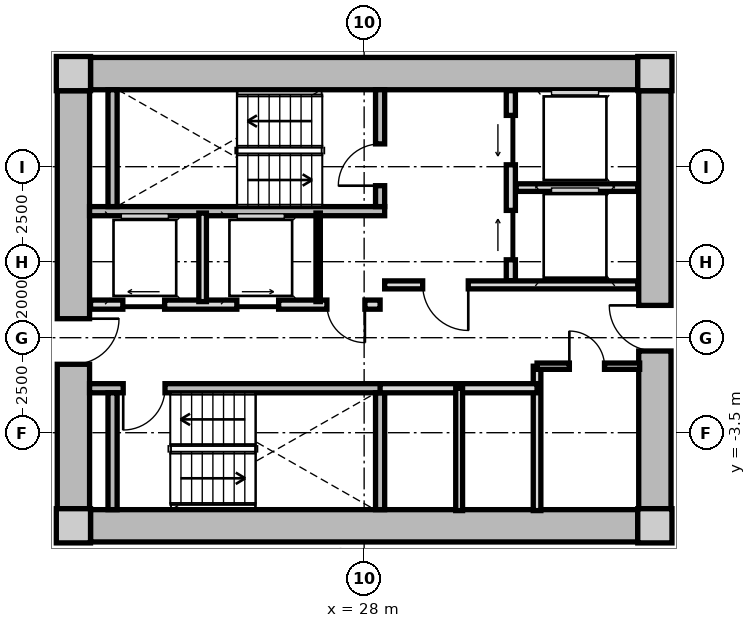
"""IFC4 building model, lengths in metres.
Left out: names, types, materials, properties, quantities, classifications, styles, units other than length and angle.
Written with IfcOpenShell. Run it as: python <this file> out.ifc"""

import sys

from ifc_helpers import new_model, si_unit, direction, frame, frame_2d, origin, origin_2d, place, context, subcontext, project, spatial, rectangle, extrude, source, transform, mapped, element, fill, save


model = new_model("IFC4")
c1 = context("Model", 3, precision=1e-05, world=origin(), true_north=direction((0.0, 1.0)))
c2 = subcontext(c1, "Body", "Model", "MODEL_VIEW")
j1 = project(units=[si_unit("LENGTHUNIT", "METRE"), si_unit("PLANEANGLEUNIT", "RADIAN")], contexts=[c1])
p1 = place(None, origin())
s1 = spatial("IfcSite", under=j1, at=p1, CompositionType="ELEMENT")
p2 = place(p1, origin())
s2 = spatial("IfcBuilding", under=s1, at=p2, CompositionType="ELEMENT")
p3 = place(p2, frame((0.0, 0.0, 27.7)))
s3 = spatial("IfcBuildingStorey", under=s2, at=p3, CompositionType="ELEMENT", Elevation=27.7)
m1 = source(origin(), c2, "Body", "SweptSolid", [
    extrude(rectangle(XDim=0.9, YDim=0.9, at=origin_2d()), origin(), (0.0, 0.0, 1.0), 3.05),
])
for number, where, z_axis, x_axis in (
    (1, (20.35, -5.95, 0.0), (0.0, 0.0, 1.0), (1.0, 0.0, 0.0)),
    (2, (35.65, -5.95, 0.0), (0.0, 0.0, 1.0), (1.0, 0.0, 0.0)),
    (3, (35.65, 5.95, 0.0), (0.0, 0.0, 1.0), (1.0, 0.0, 0.0)),
    (4, (20.35, 5.95, 0.0), (0.0, 0.0, 1.0), (1.0, 0.0, 0.0)),
):
    element("IfcColumn", number, at=place(p3, frame(where, z_axis=z_axis, x_axis=x_axis)), inside=s3, PredefinedType="COLUMN", context=c2, shape_type="MappedRepresentation", body=[
        mapped(m1, transform((0.0, 0.0, 0.0), x_axis=(1.0, 0.0, 0.0), y_axis=(0.0, 1.0, 0.0), z_axis=(0.0, 0.0, 1.0), scale=1.0)),
    ])
m2 = source(origin(), c2, "Body", "SweptSolid", [
    extrude(rectangle(XDim=14.4, YDim=0.85, at=frame_2d((7.2, 0.0))), origin(), (0.0, 0.0, 1.0), 2.79),
])
for number, where, z_axis, x_axis in (
    (5, (20.8, 5.95, 0.0), (0.0, 0.0, 1.0), (1.0, 0.0, 0.0)),
    (6, (35.2, -5.95, 0.0), (0.0, 0.0, 1.0), (-1.0, 0.0, 0.0)),
):
    element("IfcWall", number, at=place(p3, frame(where, z_axis=z_axis, x_axis=x_axis)), inside=s3, PredefinedType="SHEAR", context=c2, shape_type="MappedRepresentation", body=[
        mapped(m2, transform((0.0, 0.0, 0.0), x_axis=(1.0, 0.0, 0.0), y_axis=(0.0, 1.0, 0.0), z_axis=(0.0, 0.0, 1.0), scale=1.0)),
    ])
m3 = source(origin(), c2, "Body", "SweptSolid", [
    extrude(rectangle(XDim=11.0, YDim=0.85, at=frame_2d((5.5, 0.0))), origin(), (0.0, 0.0, 1.0), 2.79),
])
p4 = place(p3, frame((20.35, -5.5, 0.0), z_axis=(0.0, 0.0, 1.0), x_axis=(0.0, 1.0, 0.0)))
e7 = element("IfcWall", 7, at=p4, inside=s3, PredefinedType="SHEAR", context=c2, shape_type="MappedRepresentation", body=[
    mapped(m3, transform((0.0, 0.0, 0.0), x_axis=(1.0, 0.0, 0.0), y_axis=(0.0, 1.0, 0.0), z_axis=(0.0, 0.0, 1.0), scale=1.0)),
])
p5 = place(p4, frame((3.8, 0.0, 0.0)))
e8 = element("IfcOpeningElement", 8, at=p5, cuts=e7, PredefinedType="OPENING", context=c2, shape_type="SweptSolid", body=[
    extrude(rectangle(XDim=1.2, YDim=2.15, at=frame_2d((0.6, 1.075))), frame((0.0, 0.435, 0.0), z_axis=(0.0, -1.0, 0.0), x_axis=(1.0, 0.0, 0.0)), (0.0, 0.0, 1.0), 0.87),
])
p6 = place(p3, frame((35.65, 5.5, 0.0), z_axis=(0.0, 0.0, 1.0), x_axis=(0.0, -1.0, 0.0)))
e9 = element("IfcWall", 9, at=p6, inside=s3, PredefinedType="SHEAR", context=c2, shape_type="MappedRepresentation", body=[
    mapped(m3, transform((0.0, 0.0, 0.0), x_axis=(1.0, 0.0, 0.0), y_axis=(0.0, 1.0, 0.0), z_axis=(0.0, 0.0, 1.0), scale=1.0)),
])
p7 = place(p6, frame((5.65, 0.0, 0.0)))
e10 = element("IfcOpeningElement", 10, at=p7, cuts=e9, PredefinedType="OPENING", context=c2, shape_type="SweptSolid", body=[
    extrude(rectangle(XDim=1.2, YDim=2.15, at=frame_2d((0.6, 1.075))), frame((0.0, 0.435, 0.0), z_axis=(0.0, -1.0, 0.0), x_axis=(1.0, 0.0, 0.0)), (0.0, 0.0, 1.0), 0.87),
])
m4 = source(origin(), c2, "Body", "SweptSolid", [
    extrude(rectangle(XDim=7.765, YDim=0.24, at=frame_2d((3.883, 0.0))), origin(), (0.0, 0.0, 1.0), 2.79),
])
p8 = place(p3, frame((20.775, 2.33, 0.0), z_axis=(0.0, 0.0, 1.0), x_axis=(1.0, 0.0, 0.0)))
e11 = element("IfcWall", 11, at=p8, inside=s3, PredefinedType="PARTITIONING", context=c2, shape_type="MappedRepresentation", body=[
    mapped(m4, transform((0.0, 0.0, 0.0), x_axis=(1.0, 0.0, 0.0), y_axis=(0.0, 1.0, 0.0), z_axis=(0.0, 0.0, 1.0), scale=1.0)),
])
m5 = source(origin(), c2, "Body", "SweptSolid", [
    extrude(rectangle(XDim=3.075, YDim=0.24, at=frame_2d((1.538, 0.0))), origin(), (0.0, 0.0, 1.0), 2.79),
])
p9 = place(p3, frame((21.38, 2.45, 0.0), z_axis=(0.0, 0.0, 1.0), x_axis=(0.0, 1.0, 0.0)))
e12 = element("IfcWall", 12, at=p9, inside=s3, PredefinedType="PARTITIONING", context=c2, shape_type="MappedRepresentation", body=[
    mapped(m5, transform((0.0, 0.0, 0.0), x_axis=(1.0, 0.0, 0.0), y_axis=(0.0, 1.0, 0.0), z_axis=(0.0, 0.0, 1.0), scale=1.0)),
])
p10 = place(p3, frame((28.42, 2.45, 0.0), z_axis=(0.0, 0.0, 1.0), x_axis=(0.0, 1.0, 0.0)))
e13 = element("IfcWall", 13, at=p10, inside=s3, PredefinedType="PARTITIONING", context=c2, shape_type="MappedRepresentation", body=[
    mapped(m5, transform((0.0, 0.0, 0.0), x_axis=(1.0, 0.0, 0.0), y_axis=(0.0, 1.0, 0.0), z_axis=(0.0, 0.0, 1.0), scale=1.0)),
])
p11 = place(p10, frame((0.55, 0.0, 0.0)))
e14 = element("IfcOpeningElement", 14, at=p11, cuts=e13, PredefinedType="OPENING", context=c2, shape_type="SweptSolid", body=[
    extrude(rectangle(XDim=1.1, YDim=2.15, at=frame_2d((0.55, 1.075))), frame((0.0, 0.13, 0.0), z_axis=(0.0, -1.0, 0.0), x_axis=(1.0, 0.0, 0.0)), (0.0, 0.0, 1.0), 0.26),
])
p12 = place(p3, frame((20.775, -2.33, 0.0), z_axis=(0.0, 0.0, 1.0), x_axis=(1.0, 0.0, 0.0)))
e15 = element("IfcWall", 15, at=p12, inside=s3, PredefinedType="PARTITIONING", context=c2, shape_type="MappedRepresentation", body=[
    mapped(m4, transform((0.0, 0.0, 0.0), x_axis=(1.0, 0.0, 0.0), y_axis=(0.0, 1.0, 0.0), z_axis=(0.0, 0.0, 1.0), scale=1.0)),
])
p13 = place(p12, frame((0.885, 0.0, 0.0)))
e16 = element("IfcOpeningElement", 16, at=p13, cuts=e15, PredefinedType="OPENING", context=c2, shape_type="SweptSolid", body=[
    extrude(rectangle(XDim=1.1, YDim=2.15, at=frame_2d((0.55, 1.075))), frame((0.0, 0.13, 0.0), z_axis=(0.0, -1.0, 0.0), x_axis=(1.0, 0.0, 0.0)), (0.0, 0.0, 1.0), 0.26),
])
for number, where, z_axis, x_axis in (
    (17, (21.38, -5.525, 0.0), (0.0, 0.0, 1.0), (0.0, 1.0, 0.0)),
    (18, (28.42, -5.525, 0.0), (0.0, 0.0, 1.0), (0.0, 1.0, 0.0)),
):
    element("IfcWall", number, at=place(p3, frame(where, z_axis=z_axis, x_axis=x_axis)), inside=s3, PredefinedType="PARTITIONING", context=c2, shape_type="MappedRepresentation", body=[
        mapped(m5, transform((0.0, 0.0, 0.0), x_axis=(1.0, 0.0, 0.0), y_axis=(0.0, 1.0, 0.0), z_axis=(0.0, 0.0, 1.0), scale=1.0)),
    ])
m6 = source(origin(), c2, "Body", "SweptSolid", [
    extrude(rectangle(XDim=5.0, YDim=0.24, at=frame_2d((2.5, 0.0))), origin(), (0.0, 0.0, 1.0), 2.775),
])
p14 = place(p3, frame((31.86, 0.5, 0.0), z_axis=(0.0, 0.0, 1.0), x_axis=(0.0, 1.0, 0.0)))
e19 = element("IfcWall", 19, at=p14, inside=s3, PredefinedType="PARTITIONING", context=c2, shape_type="MappedRepresentation", body=[
    mapped(m6, transform((0.0, 0.0, 0.0), x_axis=(1.0, 0.0, 0.0), y_axis=(0.0, 1.0, 0.0), z_axis=(0.0, 0.0, 1.0), scale=1.0)),
])
p15 = place(p14, frame((3.05, 0.0, 0.0)))
e20 = element("IfcOpeningElement", 20, at=p15, cuts=e19, PredefinedType="OPENING", context=c2, shape_type="SweptSolid", body=[
    extrude(rectangle(XDim=1.3, YDim=2.2, at=frame_2d((0.65, 1.1))), frame((0.0, 0.13, 0.0), z_axis=(0.0, -1.0, 0.0), x_axis=(1.0, 0.0, 0.0)), (0.0, 0.0, 1.0), 0.26),
])
p16 = place(p14, frame((0.55, 0.0, 0.0)))
e21 = element("IfcOpeningElement", 21, at=p16, cuts=e19, PredefinedType="OPENING", context=c2, shape_type="SweptSolid", body=[
    extrude(rectangle(XDim=1.3, YDim=2.2, at=frame_2d((0.65, 1.1))), frame((0.0, 0.13, 0.0), z_axis=(0.0, -1.0, 0.0), x_axis=(1.0, 0.0, 0.0)), (0.0, 0.0, 1.0), 0.26),
])
m7 = source(origin(), c2, "Body", "SweptSolid", [
    extrude(rectangle(XDim=3.2, YDim=0.2, at=frame_2d((1.6, 0.0))), origin(), (0.0, 0.0, 1.0), 2.775),
])
p17 = place(p3, frame((32.0, 2.95, 0.0), z_axis=(0.0, 0.0, 1.0), x_axis=(1.0, 0.0, 0.0)))
e22 = element("IfcWall", 22, at=p17, inside=s3, PredefinedType="PARTITIONING", context=c2, shape_type="MappedRepresentation", body=[
    mapped(m7, transform((0.0, 0.0, 0.0), x_axis=(1.0, 0.0, 0.0), y_axis=(0.0, 1.0, 0.0), z_axis=(0.0, 0.0, 1.0), scale=1.0)),
])
m8 = source(origin(), c2, "Body", "SweptSolid", [
    extrude(rectangle(XDim=6.66, YDim=0.21, at=frame_2d((3.33, 0.0))), origin(), (0.0, 0.0, 1.0), 2.775),
])
p18 = place(p3, frame((28.54, 0.39, 0.0), z_axis=(0.0, 0.0, 1.0), x_axis=(1.0, 0.0, 0.0)))
e23 = element("IfcWall", 23, at=p18, inside=s3, PredefinedType="PARTITIONING", context=c2, shape_type="MappedRepresentation", body=[
    mapped(m8, transform((0.0, 0.0, 0.0), x_axis=(1.0, 0.0, 0.0), y_axis=(0.0, 1.0, 0.0), z_axis=(0.0, 0.0, 1.0), scale=1.0)),
])
p19 = place(p18, frame((1.0, 0.0, 0.0)))
e24 = element("IfcOpeningElement", 24, at=p19, cuts=e23, PredefinedType="OPENING", context=c2, shape_type="SweptSolid", body=[
    extrude(rectangle(XDim=1.2, YDim=2.15, at=frame_2d((0.6, 1.075))), frame((0.0, 0.115, 0.0), z_axis=(0.0, -1.0, 0.0), x_axis=(1.0, 0.0, 0.0)), (0.0, 0.0, 1.0), 0.23),
])
m9 = source(origin(), c2, "Body", "SweptSolid", [
    extrude(rectangle(XDim=7.62, YDim=0.24, at=frame_2d((3.81, 0.0))), origin(), (0.0, 0.0, 1.0), 2.775),
])
p20 = place(p3, frame((20.8, -0.13, 0.0), z_axis=(0.0, 0.0, 1.0), x_axis=(1.0, 0.0, 0.0)))
e25 = element("IfcWall", 25, at=p20, inside=s3, PredefinedType="PARTITIONING", context=c2, shape_type="MappedRepresentation", body=[
    mapped(m9, transform((0.0, 0.0, 0.0), x_axis=(1.0, 0.0, 0.0), y_axis=(0.0, 1.0, 0.0), z_axis=(0.0, 0.0, 1.0), scale=1.0)),
])
p21 = place(p20, frame((6.22, 0.0, 0.0)))
e26 = element("IfcOpeningElement", 26, at=p21, cuts=e25, PredefinedType="OPENING", context=c2, shape_type="SweptSolid", body=[
    extrude(rectangle(XDim=1.0, YDim=2.1, at=frame_2d((0.5, 1.05))), frame((0.0, 0.13, 0.0), z_axis=(0.0, -1.0, 0.0), x_axis=(1.0, 0.0, 0.0)), (0.0, 0.0, 1.0), 0.26),
])
p22 = place(p20, frame((0.85, 0.0, 0.0)))
e27 = element("IfcOpeningElement", 27, at=p22, cuts=e25, PredefinedType="OPENING", context=c2, shape_type="SweptSolid", body=[
    extrude(rectangle(XDim=1.1, YDim=2.2, at=frame_2d((0.55, 1.1))), frame((0.0, 0.13, 0.0), z_axis=(0.0, -1.0, 0.0), x_axis=(1.0, 0.0, 0.0)), (0.0, 0.0, 1.0), 0.26),
])
p23 = place(p20, frame((3.85, 0.0, 0.0)))
e28 = element("IfcOpeningElement", 28, at=p23, cuts=e25, PredefinedType="OPENING", context=c2, shape_type="SweptSolid", body=[
    extrude(rectangle(XDim=1.1, YDim=2.2, at=frame_2d((0.55, 1.1))), frame((0.0, 0.13, 0.0), z_axis=(0.0, -1.0, 0.0), x_axis=(1.0, 0.0, 0.0)), (0.0, 0.0, 1.0), 0.26),
])
m10 = source(origin(), c2, "Body", "SweptSolid", [
    extrude(rectangle(XDim=2.33, YDim=0.115, at=frame_2d((1.165, 0.0))), origin(), (0.0, 0.0, 1.0), 2.775),
])
p24 = place(p3, frame((26.79, -0.05, 0.0), z_axis=(0.0, 0.0, 1.0), x_axis=(0.0, 1.0, 0.0)))
e29 = element("IfcWall", 29, at=p24, inside=s3, PredefinedType="PARTITIONING", context=c2, shape_type="MappedRepresentation", body=[
    mapped(m10, transform((0.0, 0.0, 0.0), x_axis=(1.0, 0.0, 0.0), y_axis=(0.0, 1.0, 0.0), z_axis=(0.0, 0.0, 1.0), scale=1.0)),
])
m11 = source(origin(), c2, "Body", "SweptSolid", [
    extrude(rectangle(XDim=2.33, YDim=0.2, at=frame_2d((1.165, 0.0))), origin(), (0.0, 0.0, 1.0), 2.775),
])
p25 = place(p3, frame((23.75, -0.05, 0.0), z_axis=(0.0, 0.0, 1.0), x_axis=(0.0, 1.0, 0.0)))
e30 = element("IfcWall", 30, at=p25, inside=s3, PredefinedType="PARTITIONING", context=c2, shape_type="MappedRepresentation", body=[
    mapped(m11, transform((0.0, 0.0, 0.0), x_axis=(1.0, 0.0, 0.0), y_axis=(0.0, 1.0, 0.0), z_axis=(0.0, 0.0, 1.0), scale=1.0)),
])
m12 = source(origin(), c2, "Body", "SweptSolid", [
    extrude(rectangle(XDim=3.8, YDim=0.2, at=frame_2d((1.9, 0.0))), origin(), (0.0, 0.0, 1.0), 2.775),
])
p26 = place(p3, frame((32.55, -5.55, 0.0), z_axis=(0.0, 0.0, 1.0), x_axis=(0.0, 1.0, 0.0)))
e31 = element("IfcWall", 31, at=p26, inside=s3, PredefinedType="PARTITIONING", context=c2, shape_type="MappedRepresentation", body=[
    mapped(m12, transform((0.0, 0.0, 0.0), x_axis=(1.0, 0.0, 0.0), y_axis=(0.0, 1.0, 0.0), z_axis=(0.0, 0.0, 1.0), scale=1.0)),
])
m13 = source(origin(), c2, "Body", "SweptSolid", [
    extrude(rectangle(XDim=4.13, YDim=0.24, at=frame_2d((2.065, 0.0))), origin(), (0.0, 0.0, 1.0), 2.775),
])
p27 = place(p3, frame((28.42, -2.33, 0.0), z_axis=(0.0, 0.0, 1.0), x_axis=(1.0, 0.0, 0.0)))
e32 = element("IfcWall", 32, at=p27, inside=s3, PredefinedType="PARTITIONING", context=c2, shape_type="MappedRepresentation", body=[
    mapped(m13, transform((0.0, 0.0, 0.0), x_axis=(1.0, 0.0, 0.0), y_axis=(0.0, 1.0, 0.0), z_axis=(0.0, 0.0, 1.0), scale=1.0)),
])
m14 = source(origin(), c2, "Body", "SweptSolid", [
    extrude(rectangle(XDim=3.22, YDim=0.18, at=frame_2d((1.61, 0.0))), origin(), (0.0, 0.0, 1.0), 2.775),
])
p28 = place(p3, frame((30.5, -5.55, 0.0), z_axis=(0.0, 0.0, 1.0), x_axis=(0.0, 1.0, 0.0)))
e33 = element("IfcWall", 33, at=p28, inside=s3, PredefinedType="PARTITIONING", context=c2, shape_type="MappedRepresentation", body=[
    mapped(m14, transform((0.0, 0.0, 0.0), x_axis=(1.0, 0.0, 0.0), y_axis=(0.0, 1.0, 0.0), z_axis=(0.0, 0.0, 1.0), scale=1.0)),
])
m15 = source(origin(), c2, "Body", "SweptSolid", [
    extrude(rectangle(XDim=2.7, YDim=0.165, at=frame_2d((1.35, 0.0))), origin(), (0.0, 0.0, 1.0), 2.775),
])
p29 = place(p3, frame((32.55, -1.75, 0.0), z_axis=(0.0, 0.0, 1.0), x_axis=(1.0, 0.0, 0.0)))
e34 = element("IfcWall", 34, at=p29, inside=s3, PredefinedType="PARTITIONING", context=c2, shape_type="MappedRepresentation", body=[
    mapped(m15, transform((0.0, 0.0, 0.0), x_axis=(1.0, 0.0, 0.0), y_axis=(0.0, 1.0, 0.0), z_axis=(0.0, 0.0, 1.0), scale=1.0)),
])
p30 = place(p29, frame((0.85, 0.0, 0.0)))
e35 = element("IfcOpeningElement", 35, at=p30, cuts=e34, PredefinedType="OPENING", context=c2, shape_type="SweptSolid", body=[
    extrude(rectangle(XDim=0.925, YDim=2.1, at=frame_2d((0.462, 1.05))), frame((0.0, 0.093, 0.0), z_axis=(0.0, -1.0, 0.0), x_axis=(1.0, 0.0, 0.0)), (0.0, 0.0, 1.0), 0.185),
])
m16 = source(origin(), c2, "Body", "SweptSolid", [
    extrude(rectangle(XDim=1.1, YDim=2.15, at=frame_2d((0.55, 1.075))), frame((0.0, 0.025, 0.0), z_axis=(0.0, -1.0, 0.0), x_axis=(1.0, 0.0, 0.0)), (0.0, 0.0, 1.0), 0.05),
])
p31 = place(p11, origin())
e36 = element("IfcDoor", 36, at=p31, inside=s3, OperationType="SINGLE_SWING_LEFT", PredefinedType="DOOR", context=c2, shape_type="MappedRepresentation", body=[
    mapped(m16, transform((0.0, 0.0, 0.0), x_axis=(1.0, 0.0, 0.0), y_axis=(0.0, 1.0, 0.0), z_axis=(0.0, 0.0, 1.0), scale=1.0)),
])
fill(e14, e36)
p32 = place(p13, frame((1.1, 0.0, 0.0), z_axis=(0.0, 0.0, 1.0), x_axis=(-1.0, 0.0, 0.0)))
e37 = element("IfcDoor", 37, at=p32, inside=s3, OperationType="SINGLE_SWING_RIGHT", PredefinedType="DOOR", context=c2, shape_type="MappedRepresentation", body=[
    mapped(m16, transform((0.0, 0.0, 0.0), x_axis=(1.0, 0.0, 0.0), y_axis=(0.0, 1.0, 0.0), z_axis=(0.0, 0.0, 1.0), scale=1.0)),
])
fill(e16, e37)
m17 = source(origin(), c2, "Body", "SweptSolid", [
    extrude(rectangle(XDim=1.3, YDim=2.2, at=frame_2d((0.65, 1.1))), frame((0.0, 0.025, 0.0), z_axis=(0.0, -1.0, 0.0), x_axis=(1.0, 0.0, 0.0)), (0.0, 0.0, 1.0), 0.05),
])
p33 = place(p15, origin())
e38 = element("IfcDoor", 38, at=p33, inside=s3, OperationType="SLIDING_TO_LEFT", PredefinedType="DOOR", context=c2, shape_type="MappedRepresentation", body=[
    mapped(m17, transform((0.0, 0.0, 0.0), x_axis=(1.0, 0.0, 0.0), y_axis=(0.0, 1.0, 0.0), z_axis=(0.0, 0.0, 1.0), scale=1.0)),
])
fill(e20, e38)
p34 = place(p16, origin())
e39 = element("IfcDoor", 39, at=p34, inside=s3, OperationType="SLIDING_TO_RIGHT", PredefinedType="DOOR", context=c2, shape_type="MappedRepresentation", body=[
    mapped(m17, transform((0.0, 0.0, 0.0), x_axis=(1.0, 0.0, 0.0), y_axis=(0.0, 1.0, 0.0), z_axis=(0.0, 0.0, 1.0), scale=1.0)),
])
fill(e21, e39)
m18 = source(origin(), c2, "Body", "SweptSolid", [
    extrude(rectangle(XDim=1.2, YDim=2.15, at=frame_2d((0.6, 1.075))), frame((0.0, 0.025, 0.0), z_axis=(0.0, -1.0, 0.0), x_axis=(1.0, 0.0, 0.0)), (0.0, 0.0, 1.0), 0.05),
])
p35 = place(p19, frame((1.2, 0.0, 0.0), z_axis=(0.0, 0.0, 1.0), x_axis=(-1.0, 0.0, 0.0)))
e40 = element("IfcDoor", 40, at=p35, inside=s3, OperationType="SINGLE_SWING_LEFT", PredefinedType="DOOR", context=c2, shape_type="MappedRepresentation", body=[
    mapped(m18, transform((0.0, 0.0, 0.0), x_axis=(1.0, 0.0, 0.0), y_axis=(0.0, 1.0, 0.0), z_axis=(0.0, 0.0, 1.0), scale=1.0)),
])
fill(e24, e40)
p36 = place(p5, frame((1.2, 0.0, 0.0), z_axis=(0.0, 0.0, 1.0), x_axis=(-1.0, 0.0, 0.0)))
e41 = element("IfcDoor", 41, at=p36, inside=s3, OperationType="SINGLE_SWING_LEFT", PredefinedType="DOOR", context=c2, shape_type="MappedRepresentation", body=[
    mapped(m18, transform((0.0, 0.0, 0.0), x_axis=(1.0, 0.0, 0.0), y_axis=(0.0, 1.0, 0.0), z_axis=(0.0, 0.0, 1.0), scale=1.0)),
])
fill(e8, e41)
p37 = place(p7, frame((1.2, 0.0, 0.0), z_axis=(0.0, 0.0, 1.0), x_axis=(-1.0, 0.0, 0.0)))
e42 = element("IfcDoor", 42, at=p37, inside=s3, OperationType="SINGLE_SWING_RIGHT", PredefinedType="DOOR", context=c2, shape_type="MappedRepresentation", body=[
    mapped(m18, transform((0.0, 0.0, 0.0), x_axis=(1.0, 0.0, 0.0), y_axis=(0.0, 1.0, 0.0), z_axis=(0.0, 0.0, 1.0), scale=1.0)),
])
fill(e10, e42)
m19 = source(origin(), c2, "Body", "SweptSolid", [
    extrude(rectangle(XDim=1.0, YDim=2.1, at=frame_2d((0.5, 1.05))), frame((0.0, 0.025, 0.0), z_axis=(0.0, -1.0, 0.0), x_axis=(1.0, 0.0, 0.0)), (0.0, 0.0, 1.0), 0.05),
])
p38 = place(p21, frame((1.0, 0.0, 0.0), z_axis=(0.0, 0.0, 1.0), x_axis=(-1.0, 0.0, 0.0)))
e43 = element("IfcDoor", 43, at=p38, inside=s3, OperationType="SINGLE_SWING_LEFT", PredefinedType="DOOR", context=c2, shape_type="MappedRepresentation", body=[
    mapped(m19, transform((0.0, 0.0, 0.0), x_axis=(1.0, 0.0, 0.0), y_axis=(0.0, 1.0, 0.0), z_axis=(0.0, 0.0, 1.0), scale=1.0)),
])
fill(e26, e43)
m20 = source(origin(), c2, "Body", "SweptSolid", [
    extrude(rectangle(XDim=1.1, YDim=2.2, at=frame_2d((0.55, 1.1))), frame((0.0, 0.025, 0.0), z_axis=(0.0, -1.0, 0.0), x_axis=(1.0, 0.0, 0.0)), (0.0, 0.0, 1.0), 0.05),
])
p39 = place(p22, origin())
e44 = element("IfcDoor", 44, at=p39, inside=s3, OperationType="SLIDING_TO_LEFT", PredefinedType="DOOR", context=c2, shape_type="MappedRepresentation", body=[
    mapped(m20, transform((0.0, 0.0, 0.0), x_axis=(1.0, 0.0, 0.0), y_axis=(0.0, 1.0, 0.0), z_axis=(0.0, 0.0, 1.0), scale=1.0)),
])
fill(e27, e44)
p40 = place(p23, origin())
e45 = element("IfcDoor", 45, at=p40, inside=s3, OperationType="SLIDING_TO_RIGHT", PredefinedType="DOOR", context=c2, shape_type="MappedRepresentation", body=[
    mapped(m20, transform((0.0, 0.0, 0.0), x_axis=(1.0, 0.0, 0.0), y_axis=(0.0, 1.0, 0.0), z_axis=(0.0, 0.0, 1.0), scale=1.0)),
])
fill(e28, e45)
m21 = source(origin(), c2, "Body", "SweptSolid", [
    extrude(rectangle(XDim=0.925, YDim=2.1, at=frame_2d((0.462, 1.05))), frame((0.0, 0.025, 0.0), z_axis=(0.0, -1.0, 0.0), x_axis=(1.0, 0.0, 0.0)), (0.0, 0.0, 1.0), 0.05),
])
p41 = place(p30, origin())
e46 = element("IfcDoor", 46, at=p41, inside=s3, OperationType="SINGLE_SWING_LEFT", PredefinedType="DOOR", context=c2, shape_type="MappedRepresentation", body=[
    mapped(m21, transform((0.0, 0.0, 0.0), x_axis=(1.0, 0.0, 0.0), y_axis=(0.0, 1.0, 0.0), z_axis=(0.0, 0.0, 1.0), scale=1.0)),
])
fill(e35, e46)
save(model, sys.argv[1])
